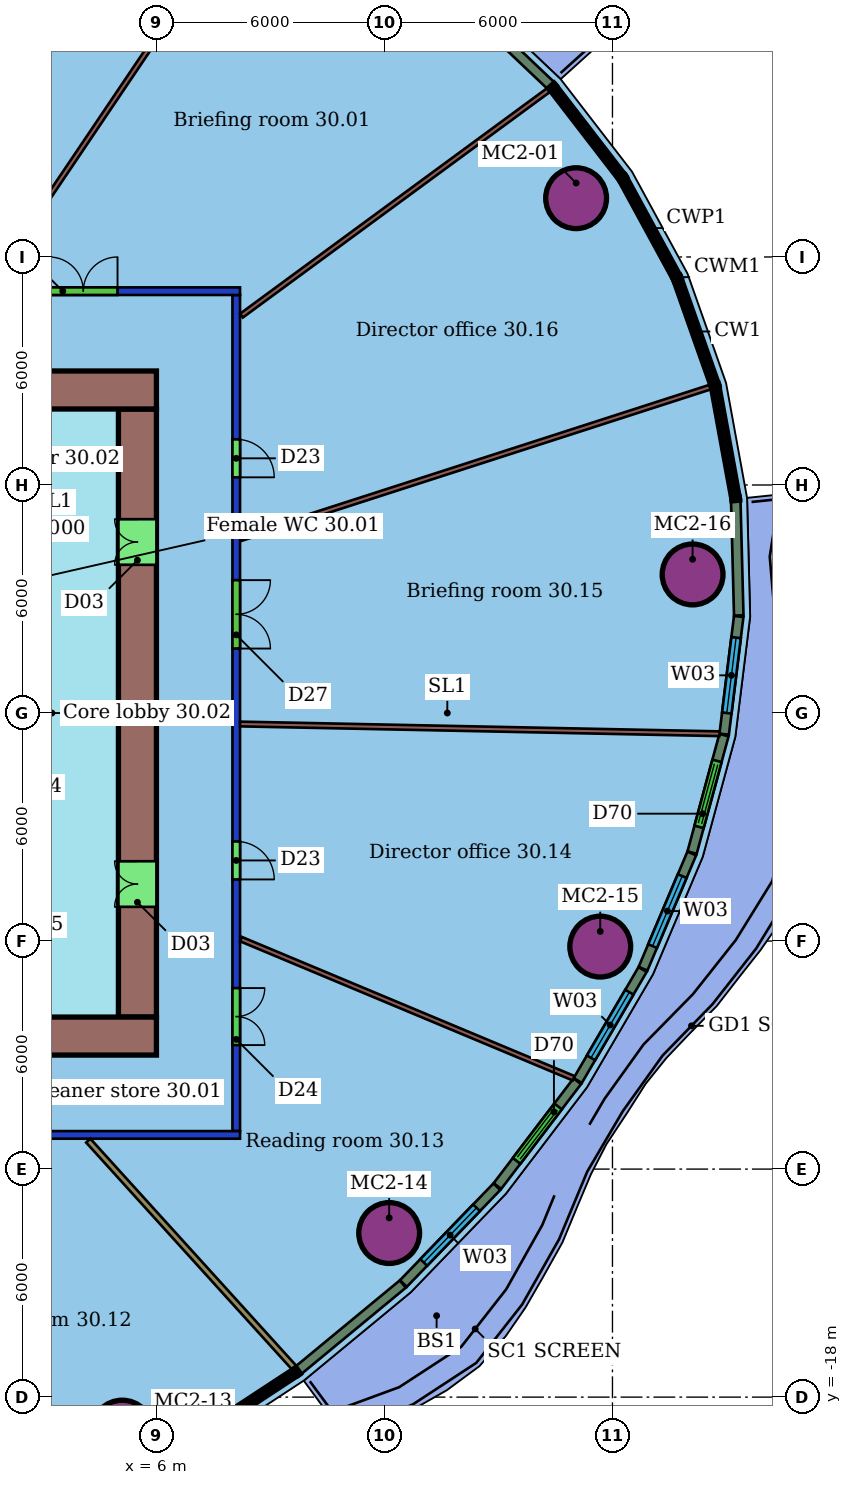
"""IFC4 building model, lengths in metres.
Left out: names, types, materials, properties, quantities, classifications, styles, units other than length and angle.
Written with IfcOpenShell. Run it as: python <this file> out.ifc"""

import sys

from ifc_helpers import new_model, si_unit, direction, frame, frame_2d, origin, origin_2d, place, context, subcontext, project, spatial, rectangle, hollow_circle, extrude, element, fill, save


model = new_model("IFC4")
c1 = context("Model", 3, precision=1e-05, world=origin(), true_north=direction((0.0, 1.0)))
c2 = subcontext(c1, "Body", "Model", "MODEL_VIEW")
j1 = project(units=[si_unit("LENGTHUNIT", "METRE"), si_unit("PLANEANGLEUNIT", "RADIAN")], contexts=[c1])
p1 = place(None, origin())
s1 = spatial("IfcSite", under=j1, at=p1, CompositionType="ELEMENT")
p2 = place(p1, origin())
s2 = spatial("IfcBuilding", under=s1, at=p2, CompositionType="ELEMENT")
p3 = place(p2, frame((0.0, 0.0, 128.2)))
s3 = spatial("IfcBuildingStorey", under=s2, at=p3, CompositionType="ELEMENT", Elevation=128.2)
for number, where, z_axis, x_axis in (
    (1, (17.043, 13.547, 0.0), (0.0, 0.0, 1.0), (1.0, 0.0, 0.0)),
    (2, (5.1, -18.881, 0.0), (0.0, 0.0, 1.0), (1.0, 0.0, 0.0)),
    (3, (12.125, -13.683, 0.0), (0.0, 0.0, 1.0), (1.0, 0.0, 0.0)),
    (4, (17.679, -6.146, 0.0), (0.0, 0.0, 1.0), (1.0, 0.0, 0.0)),
    (5, (20.109, 3.646, 0.0), (0.0, 0.0, 1.0), (1.0, 0.0, 0.0)),
):
    element("IfcColumn", number, at=place(p3, frame(where, z_axis=z_axis, x_axis=x_axis)), inside=s3, PredefinedType="COLUMN", context=c2, shape_type="SweptSolid", body=[
        extrude(hollow_circle(Radius=0.8, WallThickness=0.055, at=origin_2d()), origin(), (0.0, 0.0, 1.0), 3.45),
    ])
p4 = place(p3, frame((8.2, -11.1, 0.0), z_axis=(0.0, 0.0, 1.0), x_axis=(-1.0, 0.0, 0.0)))
e6 = element("IfcWall", 6, at=p4, inside=s3, PredefinedType="PARTITIONING", context=c2, shape_type="SweptSolid", body=[
    extrude(rectangle(XDim=28.4, YDim=0.2, at=frame_2d((14.2, 0.0))), origin(), (0.0, 0.0, 1.0), 3.0),
])
p5 = place(p4, frame((23.651, 0.0, 0.0)))
e7 = element("IfcOpeningElement", 7, at=p5, cuts=e6, PredefinedType="OPENING", context=c2, shape_type="SweptSolid", body=[
    extrude(rectangle(XDim=0.9, YDim=2.1, at=frame_2d((0.45, 1.05))), frame((0.0, 0.11, 0.0), z_axis=(0.0, -1.0, 0.0), x_axis=(1.0, 0.0, 0.0)), (0.0, 0.0, 1.0), 0.22),
])
p6 = place(p4, frame((19.365, 0.0, 0.0)))
e8 = element("IfcOpeningElement", 8, at=p6, cuts=e6, PredefinedType="OPENING", context=c2, shape_type="SweptSolid", body=[
    extrude(rectangle(XDim=0.9, YDim=2.1, at=frame_2d((0.45, 1.05))), frame((0.0, 0.11, 0.0), z_axis=(0.0, -1.0, 0.0), x_axis=(1.0, 0.0, 0.0)), (0.0, 0.0, 1.0), 0.22),
])
p7 = place(p4, frame((14.083, 0.0, 0.0)))
e9 = element("IfcOpeningElement", 9, at=p7, cuts=e6, PredefinedType="OPENING", context=c2, shape_type="SweptSolid", body=[
    extrude(rectangle(XDim=0.9, YDim=2.1, at=frame_2d((0.45, 1.05))), frame((0.0, 0.11, 0.0), z_axis=(0.0, -1.0, 0.0), x_axis=(1.0, 0.0, 0.0)), (0.0, 0.0, 1.0), 0.22),
])
p8 = place(p4, frame((8.278, 0.0, 0.0)))
e10 = element("IfcOpeningElement", 10, at=p8, cuts=e6, PredefinedType="OPENING", context=c2, shape_type="SweptSolid", body=[
    extrude(rectangle(XDim=0.9, YDim=2.1, at=frame_2d((0.45, 1.05))), frame((0.0, 0.11, 0.0), z_axis=(0.0, -1.0, 0.0), x_axis=(1.0, 0.0, 0.0)), (0.0, 0.0, 1.0), 0.22),
])
p9 = place(p3, frame((-20.2, 11.1, 0.0), z_axis=(0.0, 0.0, 1.0), x_axis=(1.0, 0.0, 0.0)))
e11 = element("IfcWall", 11, at=p9, inside=s3, PredefinedType="PARTITIONING", context=c2, shape_type="SweptSolid", body=[
    extrude(rectangle(XDim=28.4, YDim=0.2, at=frame_2d((14.2, 0.0))), origin(), (0.0, 0.0, 1.0), 3.0),
])
p10 = place(p9, frame((23.376, 0.0, 0.0)))
e12 = element("IfcOpeningElement", 12, at=p10, cuts=e11, PredefinedType="OPENING", context=c2, shape_type="SweptSolid", body=[
    extrude(rectangle(XDim=1.8, YDim=2.4, at=frame_2d((0.9, 1.2))), frame((0.0, 0.11, 0.0), z_axis=(0.0, -1.0, 0.0), x_axis=(1.0, 0.0, 0.0)), (0.0, 0.0, 1.0), 0.22),
])
p11 = place(p9, frame((19.3, 0.0, 0.0)))
e13 = element("IfcOpeningElement", 13, at=p11, cuts=e11, PredefinedType="OPENING", context=c2, shape_type="SweptSolid", body=[
    extrude(rectangle(XDim=1.0, YDim=2.4, at=frame_2d((0.5, 1.2))), frame((0.0, 0.11, 0.0), z_axis=(0.0, -1.0, 0.0), x_axis=(1.0, 0.0, 0.0)), (0.0, 0.0, 1.0), 0.22),
])
p12 = place(p9, frame((12.52, 0.0, 0.0)))
e14 = element("IfcOpeningElement", 14, at=p12, cuts=e11, PredefinedType="OPENING", context=c2, shape_type="SweptSolid", body=[
    extrude(rectangle(XDim=1.5, YDim=2.1, at=frame_2d((0.75, 1.05))), frame((0.0, 0.11, 0.0), z_axis=(0.0, -1.0, 0.0), x_axis=(1.0, 0.0, 0.0)), (0.0, 0.0, 1.0), 0.22),
])
p13 = place(p9, frame((8.278, 0.0, 0.0)))
e15 = element("IfcOpeningElement", 15, at=p13, cuts=e11, PredefinedType="OPENING", context=c2, shape_type="SweptSolid", body=[
    extrude(rectangle(XDim=0.9, YDim=2.1, at=frame_2d((0.45, 1.05))), frame((0.0, 0.11, 0.0), z_axis=(0.0, -1.0, 0.0), x_axis=(1.0, 0.0, 0.0)), (0.0, 0.0, 1.0), 0.22),
])
p14 = place(p3, frame((8.1, 11.0, 0.0), z_axis=(0.0, 0.0, 1.0), x_axis=(0.0, -1.0, 0.0)))
e16 = element("IfcWall", 16, at=p14, inside=s3, PredefinedType="PARTITIONING", context=c2, shape_type="SweptSolid", body=[
    extrude(rectangle(XDim=22.0, YDim=0.2, at=frame_2d((11.0, 0.0))), origin(), (0.0, 0.0, 1.0), 3.0),
])
p15 = place(p14, frame((18.237, 0.0, 0.0)))
e17 = element("IfcOpeningElement", 17, at=p15, cuts=e16, PredefinedType="OPENING", context=c2, shape_type="SweptSolid", body=[
    extrude(rectangle(XDim=1.5, YDim=2.1, at=frame_2d((0.75, 1.05))), frame((0.0, 0.11, 0.0), z_axis=(0.0, -1.0, 0.0), x_axis=(1.0, 0.0, 0.0)), (0.0, 0.0, 1.0), 0.22),
])
p16 = place(p14, frame((14.379, 0.0, 0.0)))
e18 = element("IfcOpeningElement", 18, at=p16, cuts=e16, PredefinedType="OPENING", context=c2, shape_type="SweptSolid", body=[
    extrude(rectangle(XDim=1.0, YDim=2.4, at=frame_2d((0.5, 1.2))), frame((0.0, 0.11, 0.0), z_axis=(0.0, -1.0, 0.0), x_axis=(1.0, 0.0, 0.0)), (0.0, 0.0, 1.0), 0.22),
])
p17 = place(p14, frame((7.503, 0.0, 0.0)))
e19 = element("IfcOpeningElement", 19, at=p17, cuts=e16, PredefinedType="OPENING", context=c2, shape_type="SweptSolid", body=[
    extrude(rectangle(XDim=1.8, YDim=2.4, at=frame_2d((0.9, 1.2))), frame((0.0, 0.11, 0.0), z_axis=(0.0, -1.0, 0.0), x_axis=(1.0, 0.0, 0.0)), (0.0, 0.0, 1.0), 0.22),
])
p18 = place(p14, frame((3.798, 0.0, 0.0)))
e20 = element("IfcOpeningElement", 20, at=p18, cuts=e16, PredefinedType="OPENING", context=c2, shape_type="SweptSolid", body=[
    extrude(rectangle(XDim=1.0, YDim=2.4, at=frame_2d((0.5, 1.2))), frame((0.0, 0.11, 0.0), z_axis=(0.0, -1.0, 0.0), x_axis=(1.0, 0.0, 0.0)), (0.0, 0.0, 1.0), 0.22),
])
p19 = place(p3, frame((16.321, 16.394, 0.0), z_axis=(0.0, 0.0, 1.0), x_axis=(-0.805953622815, -0.591978680251, 0.0)))
e21 = element("IfcWall", 21, at=p19, inside=s3, PredefinedType="PARTITIONING", context=c2, shape_type="SweptSolid", body=[
    extrude(rectangle(XDim=10.03, YDim=0.125, at=frame_2d((5.015, 0.0))), origin(), (0.0, 0.0, 1.0), 3.45),
])
p20 = place(p3, frame((8.673, 21.74, 0.0), z_axis=(0.0, 0.0, 1.0), x_axis=(-0.559416611395, -0.828886635732, 0.0)))
e22 = element("IfcWall", 22, at=p20, inside=s3, PredefinedType="PARTITIONING", context=c2, shape_type="SweptSolid", body=[
    extrude(rectangle(XDim=12.674, YDim=0.125, at=frame_2d((6.337, 0.0))), origin(), (0.0, 0.0, 1.0), 3.45),
])
p21 = place(p3, frame((9.624, -17.224, 0.0), z_axis=(0.0, 0.0, 1.0), x_axis=(-0.671881371933, 0.740658775719, 0.0)))
e23 = element("IfcWall", 23, at=p21, inside=s3, PredefinedType="PARTITIONING", context=c2, shape_type="SweptSolid", body=[
    extrude(rectangle(XDim=8.065, YDim=0.15, at=frame_2d((4.032, 0.0))), origin(), (0.0, 0.0, 1.0), 3.45),
])
p22 = place(p3, frame((16.977, -9.609, 0.0), z_axis=(0.0, 0.0, 1.0), x_axis=(-0.92257138404, 0.385826439414, 0.0)))
e24 = element("IfcWall", 24, at=p22, inside=s3, PredefinedType="PARTITIONING", context=c2, shape_type="SweptSolid", body=[
    extrude(rectangle(XDim=9.488, YDim=0.125, at=frame_2d((4.744, 0.0))), origin(), (0.0, 0.0, 1.0), 3.45),
])
p23 = place(p3, frame((20.815, -0.545, 0.0), z_axis=(0.0, 0.0, 1.0), x_axis=(-0.999793963842, 0.020298518775, 0.0)))
e25 = element("IfcWall", 25, at=p23, inside=s3, PredefinedType="PARTITIONING", context=c2, shape_type="SweptSolid", body=[
    extrude(rectangle(XDim=12.617, YDim=0.125, at=frame_2d((6.309, 0.0))), origin(), (0.0, 0.0, 1.0), 3.45),
])
p24 = place(p3, frame((20.578, 8.578, 0.0), z_axis=(0.0, 0.0, 1.0), x_axis=(-0.951657398176, -0.307161515325, 0.0)))
e26 = element("IfcWall", 26, at=p24, inside=s3, PredefinedType="PARTITIONING", context=c2, shape_type="SweptSolid", body=[
    extrude(rectangle(XDim=12.987, YDim=0.125, at=frame_2d((6.493, 0.0))), origin(), (0.0, 0.0, 1.0), 3.45),
])
p25 = place(p3, frame((16.374, 16.516, 0.0), z_axis=(0.0, 0.0, 1.0), x_axis=(-0.725398271138, 0.688329389341, 0.0)))
e27 = element("IfcWall", 27, at=p25, inside=s3, PredefinedType="SOLIDWALL", context=c2, shape_type="SweptSolid", body=[
    extrude(rectangle(XDim=3.01, YDim=0.25, at=frame_2d((1.505, 0.0))), origin(), (0.0, 0.0, 1.0), 3.05),
])
p26 = place(p3, frame((9.74, -17.29, 0.0), z_axis=(0.0, 0.0, 1.0), x_axis=(0.771117086356, 0.636693363503, 0.0)))
e28 = element("IfcWall", 28, at=p26, inside=s3, PredefinedType="SOLIDWALL", context=c2, shape_type="SweptSolid", body=[
    extrude(rectangle(XDim=3.556, YDim=0.25, at=frame_2d((1.778, 0.0))), origin(), (0.0, 0.0, 1.0), 3.05),
])
p27 = place(p3, frame((12.499, -15.01, 0.0), z_axis=(0.0, 0.0, 1.0), x_axis=(0.69458713087, 0.719408588793, 0.0)))
e29 = element("IfcWall", 29, at=p27, inside=s3, PredefinedType="SOLIDWALL", context=c2, shape_type="SweptSolid", body=[
    extrude(rectangle(XDim=3.541, YDim=0.25, at=frame_2d((1.771, 0.0))), origin(), (0.0, 0.0, 1.0), 3.05),
])
p28 = place(p27, frame((0.771, 0.0, 0.9)))
e30 = element("IfcOpeningElement", 30, at=p28, cuts=e29, PredefinedType="OPENING", context=c2, shape_type="SweptSolid", body=[
    extrude(rectangle(XDim=2.0, YDim=2.1, at=frame_2d((1.0, 1.05))), frame((0.0, 0.135, 0.0), z_axis=(0.0, -1.0, 0.0), x_axis=(1.0, 0.0, 0.0)), (0.0, 0.0, 1.0), 0.27),
])
p29 = place(p3, frame((14.973, -12.446, 0.0), z_axis=(0.0, 0.0, 1.0), x_axis=(0.605977439261, 0.795481830784, 0.0)))
e31 = element("IfcWall", 31, at=p29, inside=s3, PredefinedType="SOLIDWALL", context=c2, shape_type="SweptSolid", body=[
    extrude(rectangle(XDim=3.467, YDim=0.25, at=frame_2d((1.733, 0.0))), origin(), (0.0, 0.0, 1.0), 3.05),
])
p30 = place(p29, frame((0.833, 0.0, 0.0)))
e32 = element("IfcOpeningElement", 32, at=p30, cuts=e31, PredefinedType="OPENING", context=c2, shape_type="SweptSolid", body=[
    extrude(rectangle(XDim=1.8, YDim=2.4, at=frame_2d((0.9, 1.2))), frame((0.0, 0.135, 0.0), z_axis=(0.0, -1.0, 0.0), x_axis=(1.0, 0.0, 0.0)), (0.0, 0.0, 1.0), 0.27),
])
p31 = place(p3, frame((17.087, -9.669, 0.0), z_axis=(0.0, 0.0, 1.0), x_axis=(0.504503728062, 0.863409513714, 0.0)))
e33 = element("IfcWall", 33, at=p31, inside=s3, PredefinedType="SOLIDWALL", context=c2, shape_type="SweptSolid", body=[
    extrude(rectangle(XDim=3.382, YDim=0.25, at=frame_2d((1.691, 0.0))), origin(), (0.0, 0.0, 1.0), 3.05),
])
p32 = place(p31, frame((0.691, 0.0, 0.9)))
e34 = element("IfcOpeningElement", 34, at=p32, cuts=e33, PredefinedType="OPENING", context=c2, shape_type="SweptSolid", body=[
    extrude(rectangle(XDim=2.0, YDim=2.1, at=frame_2d((1.0, 1.05))), frame((0.0, 0.135, 0.0), z_axis=(0.0, -1.0, 0.0), x_axis=(1.0, 0.0, 0.0)), (0.0, 0.0, 1.0), 0.27),
])
p33 = place(p3, frame((18.804, -6.727, 0.0), z_axis=(0.0, 0.0, 1.0), x_axis=(0.389780302429, 0.920907875869, 0.0)))
e35 = element("IfcWall", 35, at=p33, inside=s3, PredefinedType="SOLIDWALL", context=c2, shape_type="SweptSolid", body=[
    extrude(rectangle(XDim=3.292, YDim=0.25, at=frame_2d((1.646, 0.0))), origin(), (0.0, 0.0, 1.0), 3.05),
])
p34 = place(p33, frame((0.646, 0.0, 0.9)))
e36 = element("IfcOpeningElement", 36, at=p34, cuts=e35, PredefinedType="OPENING", context=c2, shape_type="SweptSolid", body=[
    extrude(rectangle(XDim=2.0, YDim=2.1, at=frame_2d((1.0, 1.05))), frame((0.0, 0.135, 0.0), z_axis=(0.0, -1.0, 0.0), x_axis=(1.0, 0.0, 0.0)), (0.0, 0.0, 1.0), 0.27),
])
p35 = place(p3, frame((20.095, -3.672, 0.0), z_axis=(0.0, 0.0, 1.0), x_axis=(0.262091620012, 0.96504299527, 0.0)))
e37 = element("IfcWall", 37, at=p35, inside=s3, PredefinedType="SOLIDWALL", context=c2, shape_type="SweptSolid", body=[
    extrude(rectangle(XDim=3.203, YDim=0.25, at=frame_2d((1.601, 0.0))), origin(), (0.0, 0.0, 1.0), 3.05),
])
p36 = place(p35, frame((0.701, 0.0, 0.0)))
e38 = element("IfcOpeningElement", 38, at=p36, cuts=e37, PredefinedType="OPENING", context=c2, shape_type="SweptSolid", body=[
    extrude(rectangle(XDim=1.8, YDim=2.4, at=frame_2d((0.9, 1.2))), frame((0.0, 0.135, 0.0), z_axis=(0.0, -1.0, 0.0), x_axis=(1.0, 0.0, 0.0)), (0.0, 0.0, 1.0), 0.27),
])
p37 = place(p3, frame((20.94, -0.556, 0.0), z_axis=(0.0, 0.0, 1.0), x_axis=(0.122609350435, 0.992455010157, 0.0)))
e39 = element("IfcWall", 39, at=p37, inside=s3, PredefinedType="SOLIDWALL", context=c2, shape_type="SweptSolid", body=[
    extrude(rectangle(XDim=3.12, YDim=0.25, at=frame_2d((1.56, 0.0))), origin(), (0.0, 0.0, 1.0), 3.05),
])
p38 = place(p37, frame((0.56, 0.0, 0.9)))
e40 = element("IfcOpeningElement", 40, at=p38, cuts=e39, PredefinedType="OPENING", context=c2, shape_type="SweptSolid", body=[
    extrude(rectangle(XDim=2.0, YDim=2.1, at=frame_2d((1.0, 1.05))), frame((0.0, 0.135, 0.0), z_axis=(0.0, -1.0, 0.0), x_axis=(1.0, 0.0, 0.0)), (0.0, 0.0, 1.0), 0.27),
])
p39 = place(p3, frame((21.323, 2.567, 0.0), z_axis=(0.0, 0.0, 1.0), x_axis=(-0.026118966812, 0.999658841592, 0.0)))
e41 = element("IfcWall", 41, at=p39, inside=s3, PredefinedType="SOLIDWALL", context=c2, shape_type="SweptSolid", body=[
    extrude(rectangle(XDim=3.01, YDim=0.25, at=frame_2d((1.505, 0.0))), origin(), (0.0, 0.0, 1.0), 3.05),
])
p40 = place(p3, frame((6.0, 8.5, 0.0), z_axis=(0.0, 0.0, 1.0), x_axis=(-1.0, 0.0, 0.0)))
e42 = element("IfcWall", 42, at=p40, inside=s3, PredefinedType="SHEAR", context=c2, shape_type="SweptSolid", body=[
    extrude(rectangle(XDim=12.0, YDim=1.0, at=frame_2d((6.0, 0.0))), origin(), (0.0, 0.0, 1.0), 3.3),
])
p41 = place(p40, frame((5.6, 0.0, 0.0)))
e43 = element("IfcOpeningElement", 43, at=p41, cuts=e42, PredefinedType="OPENING", context=c2, shape_type="SweptSolid", body=[
    extrude(rectangle(XDim=1.2, YDim=2.1, at=frame_2d((0.6, 1.05))), frame((0.0, 0.51, 0.0), z_axis=(0.0, -1.0, 0.0), x_axis=(1.0, 0.0, 0.0)), (0.0, 0.0, 1.0), 1.02),
])
p42 = place(p3, frame((-18.0, -8.5, 0.0), z_axis=(0.0, 0.0, 1.0), x_axis=(1.0, 0.0, 0.0)))
e44 = element("IfcWall", 44, at=p42, inside=s3, PredefinedType="SHEAR", context=c2, shape_type="SweptSolid", body=[
    extrude(rectangle(XDim=24.0, YDim=1.0, at=frame_2d((12.0, 0.0))), origin(), (0.0, 0.0, 1.0), 3.3),
])
p43 = place(p42, frame((6.0, 0.0, 0.0)))
e45 = element("IfcOpeningElement", 45, at=p43, cuts=e44, PredefinedType="OPENING", context=c2, shape_type="SweptSolid", body=[
    extrude(rectangle(XDim=1.2, YDim=2.1, at=frame_2d((0.6, 1.05))), frame((0.0, 0.51, 0.0), z_axis=(0.0, -1.0, 0.0), x_axis=(1.0, 0.0, 0.0)), (0.0, 0.0, 1.0), 1.02),
])
p44 = place(p3, frame((5.5, -8.0, 0.0), z_axis=(0.0, 0.0, 1.0), x_axis=(0.0, 1.0, 0.0)))
e46 = element("IfcWall", 46, at=p44, inside=s3, PredefinedType="SHEAR", context=c2, shape_type="SweptSolid", body=[
    extrude(rectangle(XDim=16.0, YDim=1.0, at=frame_2d((8.0, 0.0))), origin(), (0.0, 0.0, 1.0), 3.3),
])
p45 = place(p44, frame((2.9, 0.0, 0.0)))
e47 = element("IfcOpeningElement", 47, at=p45, cuts=e46, PredefinedType="OPENING", context=c2, shape_type="SweptSolid", body=[
    extrude(rectangle(XDim=1.2, YDim=2.1, at=frame_2d((0.6, 1.05))), frame((0.0, 0.51, 0.0), z_axis=(0.0, -1.0, 0.0), x_axis=(1.0, 0.0, 0.0)), (0.0, 0.0, 1.0), 1.02),
])
p46 = place(p44, frame((11.9, 0.0, 0.0)))
e48 = element("IfcOpeningElement", 48, at=p46, cuts=e46, PredefinedType="OPENING", context=c2, shape_type="SweptSolid", body=[
    extrude(rectangle(XDim=1.2, YDim=2.1, at=frame_2d((0.6, 1.05))), frame((0.0, 0.51, 0.0), z_axis=(0.0, -1.0, 0.0), x_axis=(1.0, 0.0, 0.0)), (0.0, 0.0, 1.0), 1.02),
])
p47 = place(p10, origin())
e49 = element("IfcDoor", 49, at=p47, inside=s3, OperationType="DOUBLE_DOOR_SINGLE_SWING", PredefinedType="DOOR", context=c2, shape_type="SweptSolid", body=[
    extrude(rectangle(XDim=1.8, YDim=2.4, at=frame_2d((0.9, 1.2))), frame((0.0, 0.025, 0.0), z_axis=(0.0, -1.0, 0.0), x_axis=(1.0, 0.0, 0.0)), (0.0, 0.0, 1.0), 0.05),
])
fill(e12, e49)
p48 = place(p15, origin())
e50 = element("IfcDoor", 50, at=p48, inside=s3, OperationType="DOUBLE_DOOR_SINGLE_SWING", PredefinedType="DOOR", context=c2, shape_type="SweptSolid", body=[
    extrude(rectangle(XDim=1.5, YDim=2.1, at=frame_2d((0.75, 1.05))), frame((0.0, 0.025, 0.0), z_axis=(0.0, -1.0, 0.0), x_axis=(1.0, 0.0, 0.0)), (0.0, 0.0, 1.0), 0.05),
])
fill(e17, e50)
p49 = place(p16, origin())
e51 = element("IfcDoor", 51, at=p49, inside=s3, OperationType="SINGLE_SWING_RIGHT", PredefinedType="DOOR", context=c2, shape_type="SweptSolid", body=[
    extrude(rectangle(XDim=1.0, YDim=2.4, at=frame_2d((0.5, 1.2))), frame((0.0, 0.025, 0.0), z_axis=(0.0, -1.0, 0.0), x_axis=(1.0, 0.0, 0.0)), (0.0, 0.0, 1.0), 0.05),
])
fill(e18, e51)
p50 = place(p17, origin())
e52 = element("IfcDoor", 52, at=p50, inside=s3, OperationType="DOUBLE_DOOR_SINGLE_SWING", PredefinedType="DOOR", context=c2, shape_type="SweptSolid", body=[
    extrude(rectangle(XDim=1.8, YDim=2.4, at=frame_2d((0.9, 1.2))), frame((0.0, 0.025, 0.0), z_axis=(0.0, -1.0, 0.0), x_axis=(1.0, 0.0, 0.0)), (0.0, 0.0, 1.0), 0.05),
])
fill(e19, e52)
p51 = place(p18, origin())
e53 = element("IfcDoor", 53, at=p51, inside=s3, OperationType="SINGLE_SWING_RIGHT", PredefinedType="DOOR", context=c2, shape_type="SweptSolid", body=[
    extrude(rectangle(XDim=1.0, YDim=2.4, at=frame_2d((0.5, 1.2))), frame((0.0, 0.025, 0.0), z_axis=(0.0, -1.0, 0.0), x_axis=(1.0, 0.0, 0.0)), (0.0, 0.0, 1.0), 0.05),
])
fill(e20, e53)
p52 = place(p28, origin())
e54 = element("IfcWindow", 54, at=p52, inside=s3, PartitioningType="SINGLE_PANEL", PredefinedType="WINDOW", context=c2, shape_type="SweptSolid", body=[
    extrude(rectangle(XDim=2.0, YDim=2.1, at=frame_2d((1.0, 1.05))), frame((0.0, 0.03, 0.0), z_axis=(0.0, -1.0, 0.0), x_axis=(1.0, 0.0, 0.0)), (0.0, 0.0, 1.0), 0.06),
])
fill(e30, e54)
p53 = place(p30, origin())
e55 = element("IfcDoor", 55, at=p53, inside=s3, OperationType="DOUBLE_DOOR_SLIDING", PredefinedType="DOOR", context=c2, shape_type="SweptSolid", body=[
    extrude(rectangle(XDim=1.8, YDim=2.4, at=frame_2d((0.9, 1.2))), frame((0.0, 0.025, 0.0), z_axis=(0.0, -1.0, 0.0), x_axis=(1.0, 0.0, 0.0)), (0.0, 0.0, 1.0), 0.05),
])
fill(e32, e55)
p54 = place(p32, origin())
e56 = element("IfcWindow", 56, at=p54, inside=s3, PartitioningType="SINGLE_PANEL", PredefinedType="WINDOW", context=c2, shape_type="SweptSolid", body=[
    extrude(rectangle(XDim=2.0, YDim=2.1, at=frame_2d((1.0, 1.05))), frame((0.0, 0.03, 0.0), z_axis=(0.0, -1.0, 0.0), x_axis=(1.0, 0.0, 0.0)), (0.0, 0.0, 1.0), 0.06),
])
fill(e34, e56)
p55 = place(p34, origin())
e57 = element("IfcWindow", 57, at=p55, inside=s3, PartitioningType="SINGLE_PANEL", PredefinedType="WINDOW", context=c2, shape_type="SweptSolid", body=[
    extrude(rectangle(XDim=2.0, YDim=2.1, at=frame_2d((1.0, 1.05))), frame((0.0, 0.03, 0.0), z_axis=(0.0, -1.0, 0.0), x_axis=(1.0, 0.0, 0.0)), (0.0, 0.0, 1.0), 0.06),
])
fill(e36, e57)
p56 = place(p36, origin())
e58 = element("IfcDoor", 58, at=p56, inside=s3, OperationType="DOUBLE_DOOR_SLIDING", PredefinedType="DOOR", context=c2, shape_type="SweptSolid", body=[
    extrude(rectangle(XDim=1.8, YDim=2.4, at=frame_2d((0.9, 1.2))), frame((0.0, 0.025, 0.0), z_axis=(0.0, -1.0, 0.0), x_axis=(1.0, 0.0, 0.0)), (0.0, 0.0, 1.0), 0.05),
])
fill(e38, e58)
p57 = place(p38, origin())
e59 = element("IfcWindow", 59, at=p57, inside=s3, PartitioningType="SINGLE_PANEL", PredefinedType="WINDOW", context=c2, shape_type="SweptSolid", body=[
    extrude(rectangle(XDim=2.0, YDim=2.1, at=frame_2d((1.0, 1.05))), frame((0.0, 0.03, 0.0), z_axis=(0.0, -1.0, 0.0), x_axis=(1.0, 0.0, 0.0)), (0.0, 0.0, 1.0), 0.06),
])
fill(e40, e59)
p58 = place(p45, origin())
e60 = element("IfcDoor", 60, at=p58, inside=s3, OperationType="DOUBLE_DOOR_SINGLE_SWING", PredefinedType="NOTDEFINED", context=c2, shape_type="SweptSolid", body=[
    extrude(rectangle(XDim=1.2, YDim=2.1, at=frame_2d((0.6, 1.05))), frame((0.0, 0.025, 0.0), z_axis=(0.0, -1.0, 0.0), x_axis=(1.0, 0.0, 0.0)), (0.0, 0.0, 1.0), 0.05),
])
fill(e47, e60)
p59 = place(p46, origin())
e61 = element("IfcDoor", 61, at=p59, inside=s3, OperationType="DOUBLE_DOOR_SINGLE_SWING", PredefinedType="NOTDEFINED", context=c2, shape_type="SweptSolid", body=[
    extrude(rectangle(XDim=1.2, YDim=2.1, at=frame_2d((0.6, 1.05))), frame((0.0, 0.025, 0.0), z_axis=(0.0, -1.0, 0.0), x_axis=(1.0, 0.0, 0.0)), (0.0, 0.0, 1.0), 0.05),
])
fill(e48, e61)
save(model, sys.argv[1])
